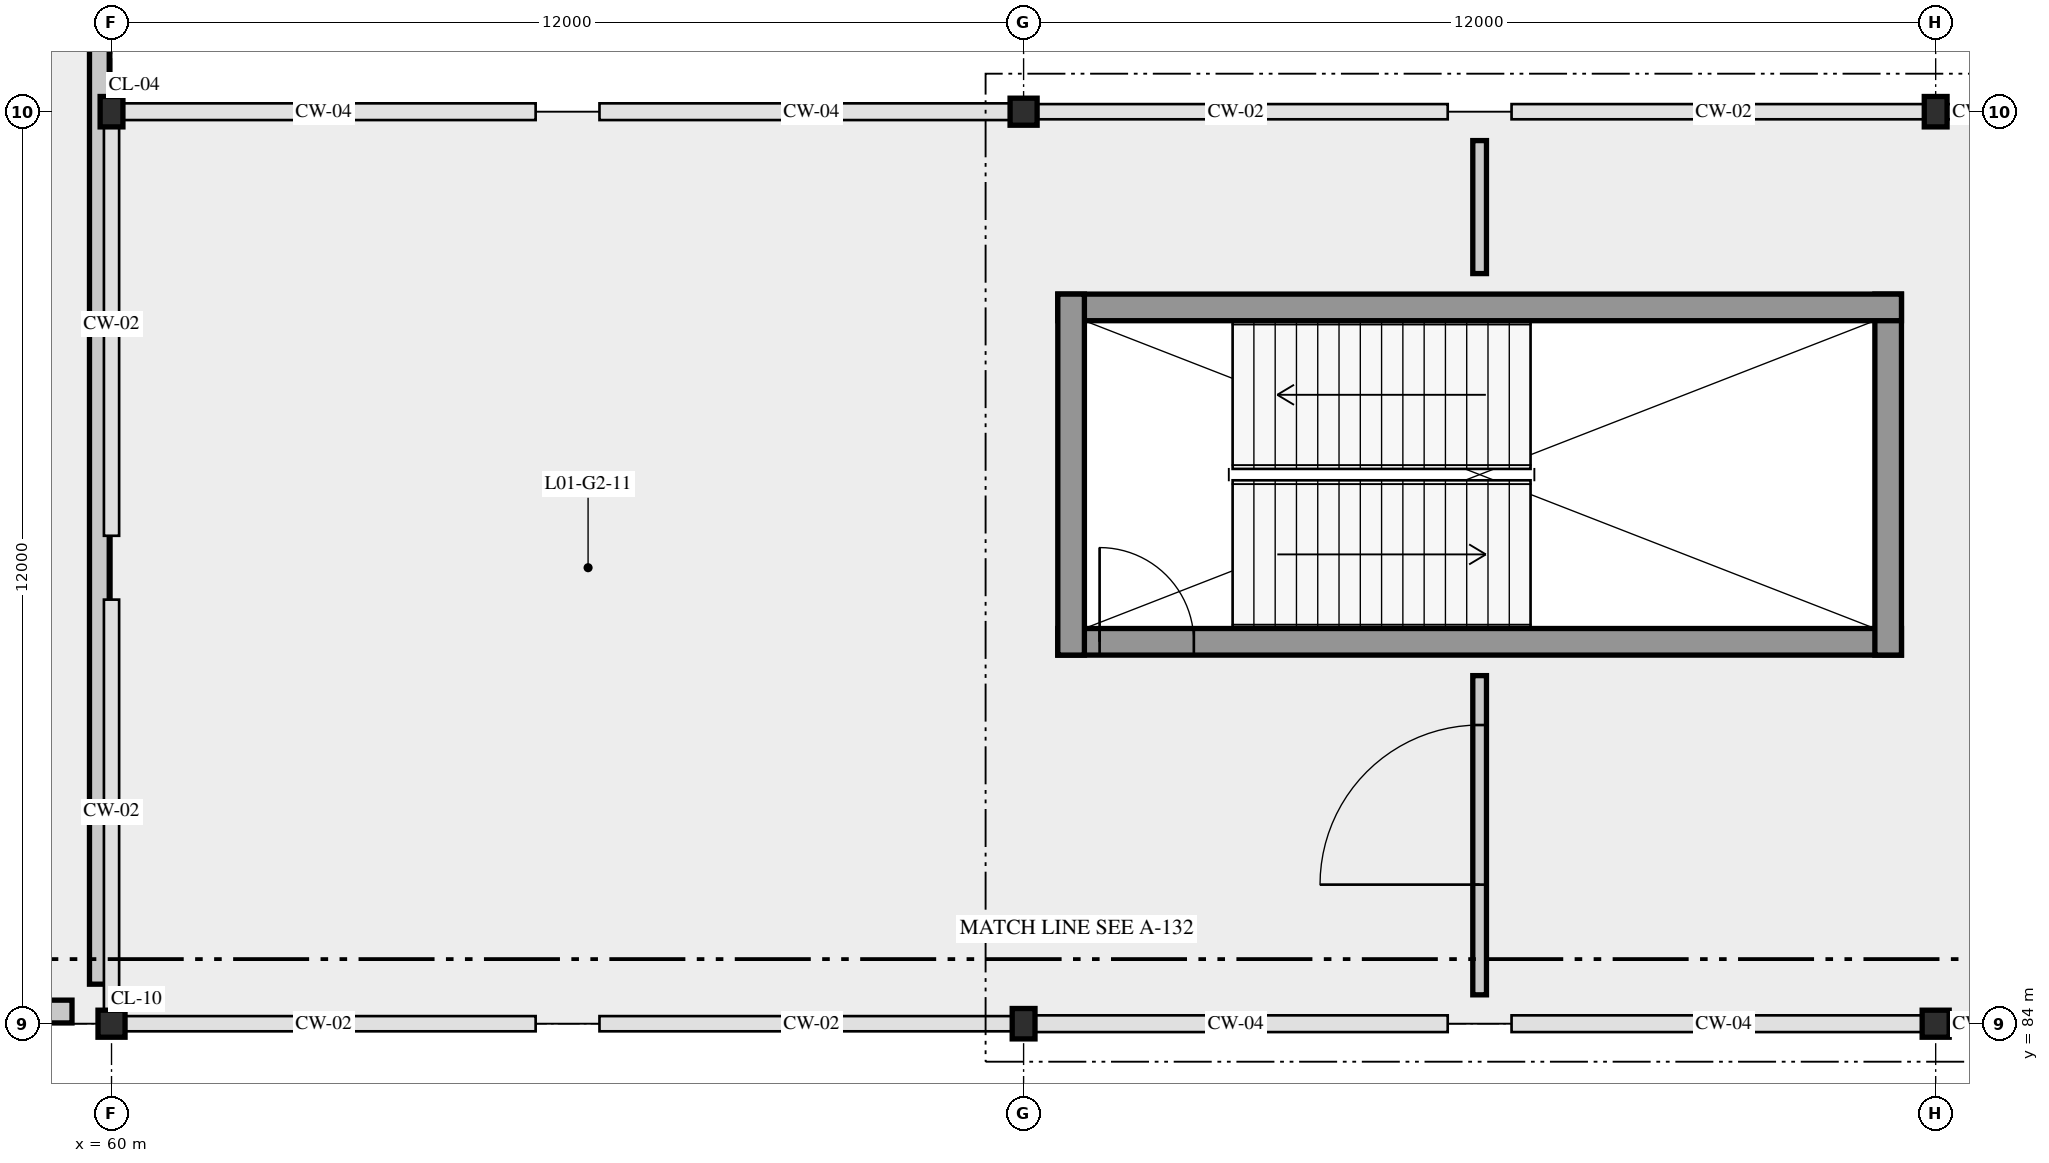
"""IFC4 building model, lengths in metres.
Left out: names, types, materials, properties, quantities, classifications, styles, units other than length and angle.
Written with IfcOpenShell. Run it as: python <this file> out.ifc"""

import sys

from ifc_helpers import new_model, si_unit, direction, frame, frame_2d, origin, origin_2d, place, context, subcontext, project, spatial, rectangle, hollow_circle, i_section, extrude, element, fill, save


model = new_model("IFC4")
c1 = context("Model", 3, precision=1e-05, world=origin(), true_north=direction((0.0, 1.0)))
c2 = subcontext(c1, "Body", "Model", "MODEL_VIEW")
j1 = project(units=[si_unit("LENGTHUNIT", "METRE"), si_unit("PLANEANGLEUNIT", "RADIAN")], contexts=[c1])
p1 = place(None, origin())
s1 = spatial("IfcSite", under=j1, at=p1, CompositionType="ELEMENT")
p2 = place(p1, origin())
s2 = spatial("IfcBuilding", under=s1, at=p2, CompositionType="ELEMENT")
p3 = place(p2, frame((0.0, 0.0, 5.4)))
s3 = spatial("IfcBuildingStorey", under=s2, at=p3, CompositionType="ELEMENT", Elevation=5.4)
p4 = place(p3, frame((60.0, 84.0, 0.0), z_axis=(0.0, 0.0, 1.0), x_axis=(1.0, 0.0, 0.0)))
e1 = element("IfcColumn", 1, at=p4, inside=s3, PredefinedType="COLUMN", context=c2, shape_type="SweptSolid", body=[
    extrude(hollow_circle(Radius=0.178, WallThickness=0.016, at=origin_2d()), origin(), (0.0, 0.0, 1.0), 5.4),
])
for number, where, z_axis, x_axis in (
    (2, (60.0, 96.0, 0.0), (0.0, 0.0, 1.0), (1.0, 0.0, 0.0)),
    (3, (72.0, 84.0, 0.0), (0.0, 0.0, 1.0), (1.0, 0.0, 0.0)),
):
    element("IfcColumn", number, at=place(p3, frame(where, z_axis=z_axis, x_axis=x_axis)), inside=s3, PredefinedType="COLUMN", context=c2, shape_type="SweptSolid", body=[
        extrude(i_section(OverallWidth=0.3, OverallDepth=0.4, WebThickness=0.013, FlangeThickness=0.024, FilletRadius=0.027, at=origin_2d()), origin(), (0.0, 0.0, 1.0), 5.4),
    ])
for number, where, z_axis, x_axis in (
    (4, (72.0, 96.0, 0.0), (0.0, 0.0, 1.0), (1.0, 0.0, 0.0)),
    (5, (84.0, 84.0, 0.0), (0.0, 0.0, 1.0), (1.0, 0.0, 0.0)),
):
    element("IfcColumn", number, at=place(p3, frame(where, z_axis=z_axis, x_axis=x_axis)), inside=s3, PredefinedType="COLUMN", context=c2, shape_type="SweptSolid", body=[
        extrude(hollow_circle(Radius=0.178, WallThickness=0.016, at=origin_2d()), origin(), (0.0, 0.0, 1.0), 5.4),
    ])
p5 = place(p3, frame((84.0, 96.0, 0.0), z_axis=(0.0, 0.0, 1.0), x_axis=(1.0, 0.0, 0.0)))
e6 = element("IfcColumn", 6, at=p5, inside=s3, PredefinedType="COLUMN", context=c2, shape_type="SweptSolid", body=[
    extrude(i_section(OverallWidth=0.3, OverallDepth=0.4, WebThickness=0.013, FlangeThickness=0.024, FilletRadius=0.027, at=origin_2d()), origin(), (0.0, 0.0, 1.0), 5.4),
])
p6 = place(p3, frame((59.84, 119.68, 0.0), z_axis=(0.0, 0.0, 1.0), x_axis=(0.0, -1.0, 0.0)))
e7 = element("IfcWall", 7, at=p6, inside=s3, PredefinedType="PARAPET", context=c2, shape_type="SweptSolid", body=[
    extrude(rectangle(XDim=35.16, YDim=0.26, at=frame_2d((17.58, 0.0))), origin(), (0.0, 0.0, 1.0), 1.15),
])
p7 = place(p3, frame((59.48, 84.16, 0.0), z_axis=(0.0, 0.0, 1.0), x_axis=(-1.0, 0.0, 0.0)))
e8 = element("IfcWall", 8, at=p7, inside=s3, PredefinedType="PARAPET", context=c2, shape_type="SweptSolid", body=[
    extrude(rectangle(XDim=10.96, YDim=0.3, at=frame_2d((5.48, 0.0))), origin(), (0.0, 0.0, 1.0), 1.15),
])
p8 = place(p3, frame((72.45, 89.025, 0.0), z_axis=(0.0, 0.0, 1.0), x_axis=(1.0, 0.0, 0.0)))
e9 = element("IfcWall", 9, at=p8, inside=s3, PredefinedType="SHEAR", context=c2, shape_type="SweptSolid", body=[
    extrude(rectangle(XDim=11.1, YDim=0.35, at=frame_2d((5.55, 0.0))), origin(), (0.0, 0.0, 1.0), 5.11),
])
p9 = place(p8, frame((0.55, 0.0, 0.0)))
e10 = element("IfcOpeningElement", 10, at=p9, cuts=e9, PredefinedType="OPENING", context=c2, shape_type="SweptSolid", body=[
    extrude(rectangle(XDim=1.24, YDim=2.25, at=frame_2d((0.62, 1.125))), frame((0.0, 0.185, 0.0), z_axis=(0.0, -1.0, 0.0), x_axis=(1.0, 0.0, 0.0)), (0.0, 0.0, 1.0), 0.37),
])
p10 = place(p3, frame((83.375, 88.85, 0.0), z_axis=(0.0, 0.0, 1.0), x_axis=(0.0, 1.0, 0.0)))
e11 = element("IfcWall", 11, at=p10, inside=s3, PredefinedType="SHEAR", context=c2, shape_type="SweptSolid", body=[
    extrude(rectangle(XDim=4.75, YDim=0.35, at=frame_2d((2.375, 0.0))), origin(), (0.0, 0.0, 1.0), 5.11),
])
p11 = place(p3, frame((83.55, 93.425, 0.0), z_axis=(0.0, 0.0, 1.0), x_axis=(-1.0, 0.0, 0.0)))
e12 = element("IfcWall", 12, at=p11, inside=s3, PredefinedType="SHEAR", context=c2, shape_type="SweptSolid", body=[
    extrude(rectangle(XDim=11.1, YDim=0.35, at=frame_2d((5.55, 0.0))), origin(), (0.0, 0.0, 1.0), 5.11),
])
p12 = place(p3, frame((72.625, 93.6, 0.0), z_axis=(0.0, 0.0, 1.0), x_axis=(0.0, -1.0, 0.0)))
e13 = element("IfcWall", 13, at=p12, inside=s3, PredefinedType="SHEAR", context=c2, shape_type="SweptSolid", body=[
    extrude(rectangle(XDim=4.75, YDim=0.35, at=frame_2d((2.375, 0.0))), origin(), (0.0, 0.0, 1.0), 5.11),
])
p13 = place(p3, frame((78.0, 84.38, 0.0), z_axis=(0.0, 0.0, 1.0), x_axis=(0.0, 1.0, 0.0)))
e14 = element("IfcWall", 14, at=p13, inside=s3, PredefinedType="PARTITIONING", context=c2, shape_type="SweptSolid", body=[
    extrude(rectangle(XDim=4.2, YDim=0.18, at=frame_2d((2.1, 0.0))), origin(), (0.0, 0.0, 1.0), 5.09),
])
p14 = place(p13, frame((1.45, 0.0, 0.0)))
e15 = element("IfcOpeningElement", 15, at=p14, cuts=e14, PredefinedType="OPENING", context=c2, shape_type="SweptSolid", body=[
    extrude(rectangle(XDim=2.1, YDim=2.5, at=frame_2d((1.05, 1.25))), frame((0.0, 0.1, 0.0), z_axis=(0.0, -1.0, 0.0), x_axis=(1.0, 0.0, 0.0)), (0.0, 0.0, 1.0), 0.2),
])
p15 = place(p3, frame((78.0, 93.87, 0.0), z_axis=(0.0, 0.0, 1.0), x_axis=(0.0, 1.0, 0.0)))
e16 = element("IfcWall", 16, at=p15, inside=s3, PredefinedType="PARTITIONING", context=c2, shape_type="SweptSolid", body=[
    extrude(rectangle(XDim=1.75, YDim=0.18, at=frame_2d((0.875, 0.0))), origin(), (0.0, 0.0, 1.0), 5.09),
])
p16 = place(p9, origin())
e17 = element("IfcDoor", 17, at=p16, inside=s3, OperationType="SINGLE_SWING_LEFT", PredefinedType="DOOR", context=c2, shape_type="SweptSolid", body=[
    extrude(rectangle(XDim=1.24, YDim=2.25, at=frame_2d((0.62, 1.125))), frame((0.0, 0.025, 0.0), z_axis=(0.0, -1.0, 0.0), x_axis=(1.0, 0.0, 0.0)), (0.0, 0.0, 1.0), 0.05),
])
fill(e10, e17)
p17 = place(p14, origin())
e18 = element("IfcDoor", 18, at=p17, inside=s3, OperationType="DOUBLE_DOOR_SINGLE_SWING", PredefinedType="DOOR", context=c2, shape_type="SweptSolid", body=[
    extrude(rectangle(XDim=2.1, YDim=2.5, at=frame_2d((1.05, 1.25))), frame((0.0, 0.025, 0.0), z_axis=(0.0, -1.0, 0.0), x_axis=(1.0, 0.0, 0.0)), (0.0, 0.0, 1.0), 0.05),
])
fill(e15, e18)
save(model, sys.argv[1])
